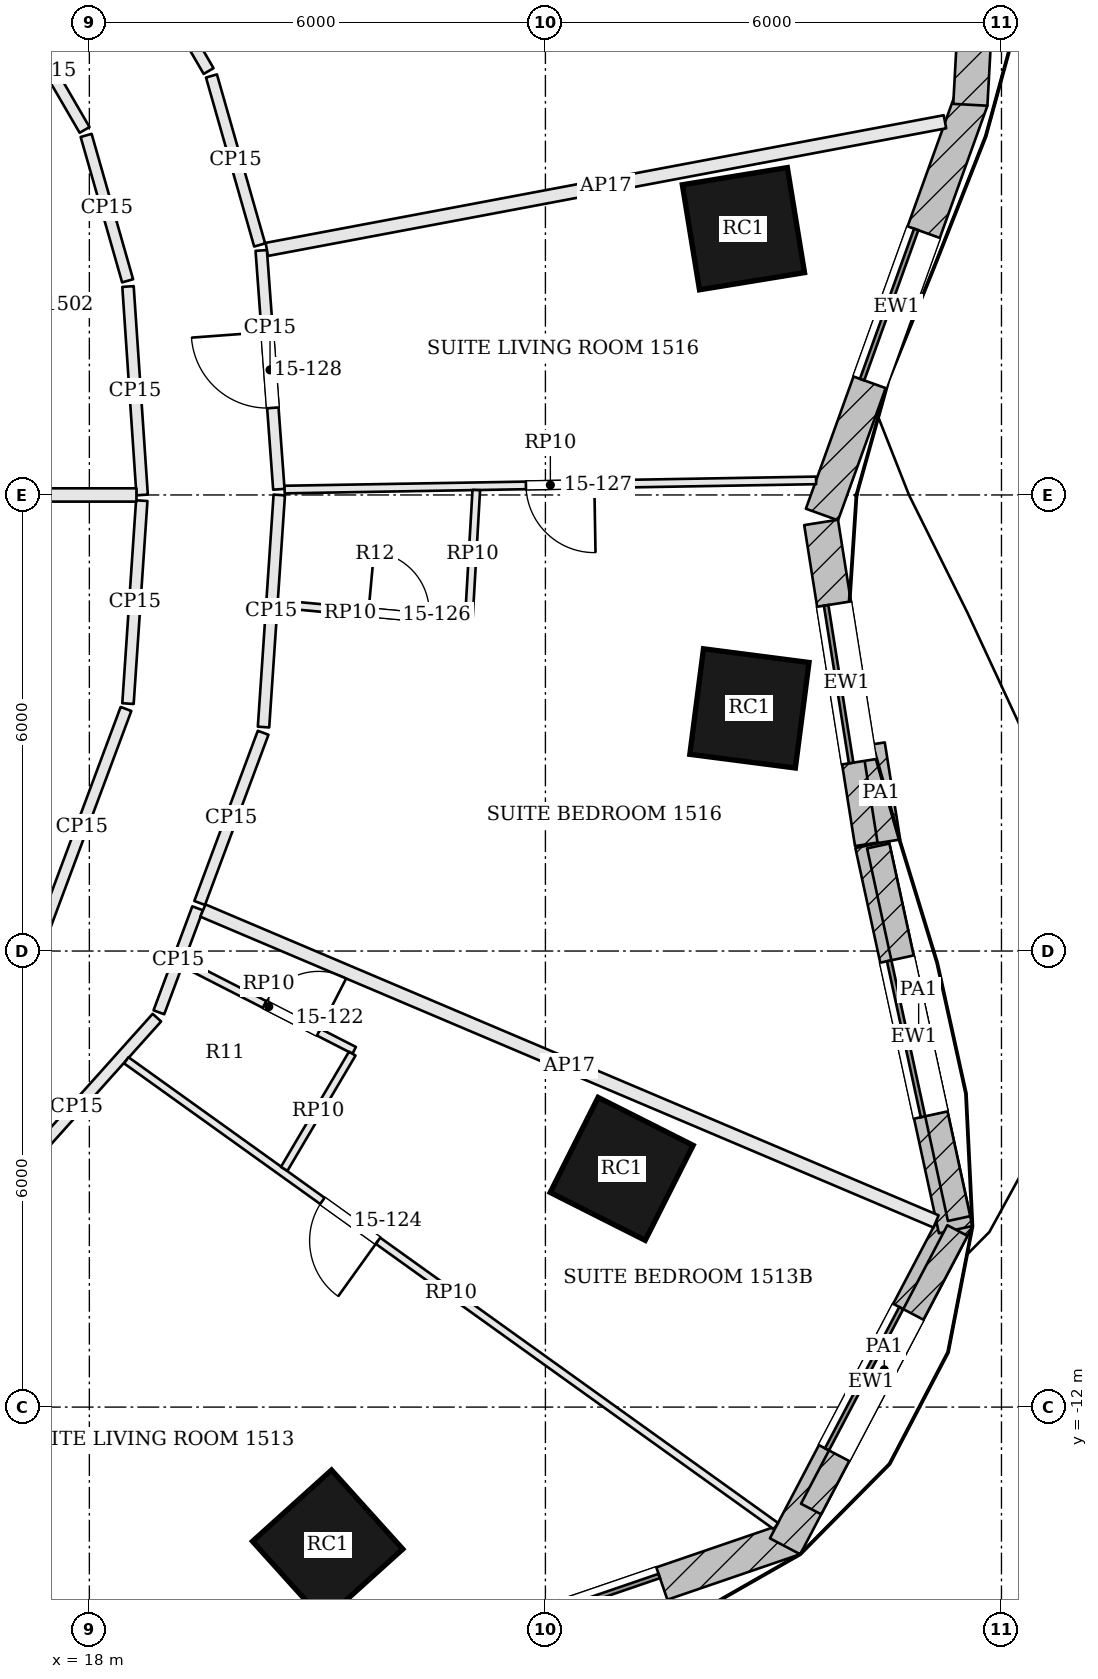
"""IFC4 building model, lengths in metres.
Left out: names, types, materials, properties, quantities, classifications, styles, units other than length and angle.
Written with IfcOpenShell. Run it as: python <this file> out.ifc"""

import sys

from ifc_helpers import new_model, si_unit, direction, frame, frame_2d, origin, origin_2d, place, context, subcontext, project, spatial, rectangle, extrude, element, fill, save


model = new_model("IFC4")
c1 = context("Model", 3, precision=1e-05, world=origin(), true_north=direction((0.0, 1.0)))
c2 = subcontext(c1, "Body", "Model", "MODEL_VIEW")
j1 = project(units=[si_unit("LENGTHUNIT", "METRE"), si_unit("PLANEANGLEUNIT", "RADIAN")], contexts=[c1])
p1 = place(None, origin())
s1 = spatial("IfcSite", under=j1, at=p1, CompositionType="ELEMENT")
p2 = place(p1, origin())
s2 = spatial("IfcBuilding", under=s1, at=p2, CompositionType="ELEMENT")
p3 = place(p2, frame((0.0, 0.0, 69.9)))
s3 = spatial("IfcBuildingStorey", under=s2, at=p3, CompositionType="ELEMENT", Elevation=69.9)
for number, where, z_axis, x_axis in (
    (1, (26.605, 3.503, 0.0), (0.0, 0.0, 1.0), (-0.161, 0.987, 0.0)),
    (2, (21.135, -13.817, 0.0), (0.0, 0.0, 1.0), (0.743, 0.67, 0.0)),
    (3, (25.003, -8.866, 0.0), (0.0, 0.0, 1.0), (0.45, 0.893, 0.0)),
    (4, (26.684, -2.808, 0.0), (0.0, 0.0, 1.0), (0.128, 0.992, 0.0)),
):
    element("IfcColumn", number, at=place(p3, frame(where, z_axis=z_axis, x_axis=x_axis)), inside=s3, PredefinedType="COLUMN", context=c2, shape_type="SweptSolid", body=[
        extrude(rectangle(XDim=1.4, YDim=1.4, at=origin_2d()), origin(), (0.0, 0.0, 1.0), 3.6),
    ])
p4 = place(p3, frame((27.638, -0.257, 0.0), z_axis=(0.0, 0.0, 1.0), x_axis=(0.338914809068, 0.940817066275, 0.0)))
e5 = element("IfcWall", 5, at=p4, inside=s3, PredefinedType="SOLIDWALL", context=c2, shape_type="SweptSolid", body=[
    extrude(rectangle(XDim=5.797, YDim=0.45, at=frame_2d((2.899, 0.0))), origin(), (0.0, 0.0, 1.0), 3.4),
])
p5 = place(p4, frame((1.849, 0.0, 0.9)))
e6 = element("IfcOpeningElement", 6, at=p5, cuts=e5, PredefinedType="OPENING", context=c2, shape_type="SweptSolid", body=[
    extrude(rectangle(XDim=2.1, YDim=2.0, at=frame_2d((1.05, 1.0))), frame((0.0, 0.235, 0.0), z_axis=(0.0, -1.0, 0.0), x_axis=(1.0, 0.0, 0.0)), (0.0, 0.0, 1.0), 0.47),
])
p6 = place(p3, frame((29.59, 5.133, 0.0), z_axis=(0.0, 0.0, 1.0), x_axis=(0.054738225791, 0.998500739427, 0.0)))
e7 = element("IfcWall", 7, at=p6, inside=s3, PredefinedType="SOLIDWALL", context=c2, shape_type="SweptSolid", body=[
    extrude(rectangle(XDim=4.656, YDim=0.45, at=frame_2d((2.328, 0.0))), origin(), (0.0, 0.0, 1.0), 3.4),
])
p7 = place(p6, frame((1.278, 0.0, 0.9)))
e8 = element("IfcOpeningElement", 8, at=p7, cuts=e7, PredefinedType="OPENING", context=c2, shape_type="SweptSolid", body=[
    extrude(rectangle(XDim=2.1, YDim=2.0, at=frame_2d((1.05, 1.0))), frame((0.0, 0.235, 0.0), z_axis=(0.0, -1.0, 0.0), x_axis=(1.0, 0.0, 0.0)), (0.0, 0.0, 1.0), 0.47),
])
p8 = place(p3, frame((21.803, -15.597, 0.0), z_axis=(0.0, 0.0, 1.0), x_axis=(0.946115314877, 0.323829910532, 0.0)))
e9 = element("IfcWall", 9, at=p8, inside=s3, PredefinedType="SOLIDWALL", context=c2, shape_type="SweptSolid", body=[
    extrude(rectangle(XDim=5.782, YDim=0.45, at=frame_2d((2.891, 0.0))), origin(), (0.0, 0.0, 1.0), 3.4),
])
p9 = place(p8, frame((1.841, 0.0, 0.9)))
e10 = element("IfcOpeningElement", 10, at=p9, cuts=e9, PredefinedType="OPENING", context=c2, shape_type="SweptSolid", body=[
    extrude(rectangle(XDim=2.1, YDim=2.0, at=frame_2d((1.05, 1.0))), frame((0.0, 0.235, 0.0), z_axis=(0.0, -1.0, 0.0), x_axis=(1.0, 0.0, 0.0)), (0.0, 0.0, 1.0), 0.47),
])
p10 = place(p3, frame((27.153, -13.831, 0.0), z_axis=(0.0, 0.0, 1.0), x_axis=(0.465165872942, 0.885223537108, 0.0)))
e11 = element("IfcWall", 11, at=p10, inside=s3, PredefinedType="SOLIDWALL", context=c2, shape_type="SweptSolid", body=[
    extrude(rectangle(XDim=4.871, YDim=0.45, at=frame_2d((2.436, 0.0))), origin(), (0.0, 0.0, 1.0), 3.4),
])
p11 = place(p10, frame((1.385, 0.0, 0.9)))
e12 = element("IfcOpeningElement", 12, at=p11, cuts=e11, PredefinedType="OPENING", context=c2, shape_type="SweptSolid", body=[
    extrude(rectangle(XDim=2.1, YDim=2.0, at=frame_2d((1.05, 1.0))), frame((0.0, 0.235, 0.0), z_axis=(0.0, -1.0, 0.0), x_axis=(1.0, 0.0, 0.0)), (0.0, 0.0, 1.0), 0.47),
])
p12 = place(p3, frame((29.397, -9.666, 0.0), z_axis=(0.0, 0.0, 1.0), x_axis=(-0.211962455994, 0.977277809657, 0.0)))
e13 = element("IfcWall", 13, at=p12, inside=s3, PredefinedType="SOLIDWALL", context=c2, shape_type="SweptSolid", body=[
    extrude(rectangle(XDim=5.186, YDim=0.45, at=frame_2d((2.593, 0.0))), origin(), (0.0, 0.0, 1.0), 3.4),
])
p13 = place(p12, frame((1.543, 0.0, 0.9)))
e14 = element("IfcOpeningElement", 14, at=p13, cuts=e13, PredefinedType="OPENING", context=c2, shape_type="SweptSolid", body=[
    extrude(rectangle(XDim=2.1, YDim=2.0, at=frame_2d((1.05, 1.0))), frame((0.0, 0.235, 0.0), z_axis=(0.0, -1.0, 0.0), x_axis=(1.0, 0.0, 0.0)), (0.0, 0.0, 1.0), 0.47),
])
p14 = place(p3, frame((28.296, -4.584, 0.0), z_axis=(0.0, 0.0, 1.0), x_axis=(-0.156402397796, 0.987693419014, 0.0)))
e15 = element("IfcWall", 15, at=p14, inside=s3, PredefinedType="SOLIDWALL", context=c2, shape_type="SweptSolid", body=[
    extrude(rectangle(XDim=4.276, YDim=0.45, at=frame_2d((2.138, 0.0))), origin(), (0.0, 0.0, 1.0), 3.4),
])
p15 = place(p14, frame((1.088, 0.0, 0.9)))
e16 = element("IfcOpeningElement", 16, at=p15, cuts=e15, PredefinedType="OPENING", context=c2, shape_type="SweptSolid", body=[
    extrude(rectangle(XDim=2.1, YDim=2.0, at=frame_2d((1.05, 1.0))), frame((0.0, 0.235, 0.0), z_axis=(0.0, -1.0, 0.0), x_axis=(1.0, 0.0, 0.0)), (0.0, 0.0, 1.0), 0.47),
])
p16 = place(p3, frame((27.495, -13.341, 3.6), z_axis=(0.0, 0.0, 1.0), x_axis=(0.46519687666, 0.88520724463, 0.0)))
e17 = element("IfcWall", 17, at=p16, inside=s3, PredefinedType="PARAPET", context=c2, shape_type="SweptSolid", body=[
    extrude(rectangle(XDim=4.139, YDim=0.3, at=frame_2d((2.069, 0.0))), origin(), (0.0, 0.0, 1.0), 1.1),
])
p17 = place(p3, frame((29.442, -9.52, 3.6), z_axis=(0.0, 0.0, 1.0), x_axis=(-0.211918382355, 0.977287367779, 0.0)))
e18 = element("IfcWall", 18, at=p17, inside=s3, PredefinedType="PARAPET", context=c2, shape_type="SweptSolid", body=[
    extrude(rectangle(XDim=5.016, YDim=0.3, at=frame_2d((2.508, 0.0))), origin(), (0.0, 0.0, 1.0), 1.1),
])
p18 = place(p3, frame((28.519, -4.556, 3.6), z_axis=(0.0, 0.0, 1.0), x_axis=(-0.156466543472, 0.987683259337, 0.0)))
e19 = element("IfcWall", 19, at=p18, inside=s3, PredefinedType="PARAPET", context=c2, shape_type="SweptSolid", body=[
    extrude(rectangle(XDim=1.293, YDim=0.3, at=frame_2d((0.647, 0.0))), origin(), (0.0, 0.0, 1.0), 1.1),
])
p19 = place(p3, frame((16.781, -9.228, 0.0), z_axis=(0.0, 0.0, 1.0), x_axis=(0.667305516611, 0.744784094554, 0.0)))
e20 = element("IfcWall", 20, at=p19, inside=s3, PredefinedType="PARTITIONING", context=c2, shape_type="SweptSolid", body=[
    extrude(rectangle(XDim=3.157, YDim=0.15, at=frame_2d((1.579, 0.0))), origin(), (0.0, 0.0, 1.0), 2.68),
])
p20 = place(p3, frame((18.915, -6.806, 0.0), z_axis=(0.0, 0.0, 1.0), x_axis=(0.349345122546, 0.936994122368, 0.0)))
e21 = element("IfcWall", 21, at=p20, inside=s3, PredefinedType="PARTITIONING", context=c2, shape_type="SweptSolid", body=[
    extrude(rectangle(XDim=1.46, YDim=0.15, at=frame_2d((0.73, 0.0))), origin(), (0.0, 0.0, 1.0), 2.68),
])
p21 = place(p3, frame((29.139, -9.557, 0.0), z_axis=(0.0, 0.0, 1.0), x_axis=(-0.920644988054, 0.390400827318, 0.0)))
e22 = element("IfcWall", 22, at=p21, inside=s3, PredefinedType="PARTITIONING", context=c2, shape_type="SweptSolid", body=[
    extrude(rectangle(XDim=10.477, YDim=0.175, at=frame_2d((5.238, 0.0))), origin(), (0.0, 0.0, 1.0), 2.68),
])
p22 = place(p3, frame((19.451, -5.368, 0.0), z_axis=(0.0, 0.0, 1.0), x_axis=(0.349432605922, 0.936961500766, 0.0)))
e23 = element("IfcWall", 23, at=p22, inside=s3, PredefinedType="PARTITIONING", context=c2, shape_type="SweptSolid", body=[
    extrude(rectangle(XDim=2.39, YDim=0.15, at=frame_2d((1.195, 0.0))), origin(), (0.0, 0.0, 1.0), 2.68),
])
p23 = place(p3, frame((20.292, -3.053, 0.0), z_axis=(0.0, 0.0, 1.0), x_axis=(0.067646719267, 0.997709337118, 0.0)))
e24 = element("IfcWall", 24, at=p23, inside=s3, PredefinedType="PARTITIONING", context=c2, shape_type="SweptSolid", body=[
    extrude(rectangle(XDim=3.061, YDim=0.15, at=frame_2d((1.53, 0.0))), origin(), (0.0, 0.0, 1.0), 2.68),
])
p24 = place(p3, frame((20.493, 0.075, 0.0), z_axis=(0.0, 0.0, 1.0), x_axis=(-0.073620484391, 0.997286330137, 0.0)))
e25 = element("IfcWall", 25, at=p24, inside=s3, PredefinedType="PARTITIONING", context=c2, shape_type="SweptSolid", body=[
    extrude(rectangle(XDim=3.15, YDim=0.15, at=frame_2d((1.575, 0.0))), origin(), (0.0, 0.0, 1.0), 2.68),
])
p25 = place(p24, frame((1.074, 0.0, 0.0)))
e26 = element("IfcOpeningElement", 26, at=p25, cuts=e25, PredefinedType="OPENING", context=c2, shape_type="SweptSolid", body=[
    extrude(rectangle(XDim=1.0, YDim=2.1, at=frame_2d((0.5, 1.05))), frame((0.0, 0.085, 0.0), z_axis=(0.0, -1.0, 0.0), x_axis=(1.0, 0.0, 0.0)), (0.0, 0.0, 1.0), 0.17),
])
p26 = place(p3, frame((29.257, 4.91, 0.0), z_axis=(0.0, 0.0, 1.0), x_axis=(-0.982744388162, -0.184968828552, 0.0)))
e27 = element("IfcWall", 27, at=p26, inside=s3, PredefinedType="PARTITIONING", context=c2, shape_type="SweptSolid", body=[
    extrude(rectangle(XDim=9.078, YDim=0.175, at=frame_2d((4.539, 0.0))), origin(), (0.0, 0.0, 1.0), 2.68),
])
p27 = place(p3, frame((20.24, 3.289, 0.0), z_axis=(0.0, 0.0, 1.0), x_axis=(-0.27423295978, 0.961663290227, 0.0)))
e28 = element("IfcWall", 28, at=p27, inside=s3, PredefinedType="PARTITIONING", context=c2, shape_type="SweptSolid", body=[
    extrude(rectangle(XDim=2.312, YDim=0.15, at=frame_2d((1.156, 0.0))), origin(), (0.0, 0.0, 1.0), 2.68),
])
p28 = place(p3, frame((19.569, 5.577, 0.0), z_axis=(0.0, 0.0, 1.0), x_axis=(-0.502457989762, 0.864601624174, 0.0)))
e29 = element("IfcWall", 29, at=p28, inside=s3, PredefinedType="PARTITIONING", context=c2, shape_type="SweptSolid", body=[
    extrude(rectangle(XDim=2.246, YDim=0.15, at=frame_2d((1.123, 0.0))), origin(), (0.0, 0.0, 1.0), 2.68),
])
p29 = place(p3, frame((17.032, 6.36, 0.0), z_axis=(0.0, 0.0, 1.0), x_axis=(0.502488551999, -0.864583862393, 0.0)))
e30 = element("IfcWall", 30, at=p29, inside=s3, PredefinedType="PARTITIONING", context=c2, shape_type="SweptSolid", body=[
    extrude(rectangle(XDim=1.802, YDim=0.15, at=frame_2d((0.901, 0.0))), origin(), (0.0, 0.0, 1.0), 2.68),
])
p30 = place(p3, frame((17.958, 4.73, 0.0), z_axis=(0.0, 0.0, 1.0), x_axis=(0.274315841816, -0.961639651288, 0.0)))
e31 = element("IfcWall", 31, at=p30, inside=s3, PredefinedType="PARTITIONING", context=c2, shape_type="SweptSolid", body=[
    extrude(rectangle(XDim=1.989, YDim=0.15, at=frame_2d((0.995, 0.0))), origin(), (0.0, 0.0, 1.0), 2.68),
])
p31 = place(p3, frame((18.508, 2.742, 0.0), z_axis=(0.0, 0.0, 1.0), x_axis=(0.067774714774, -0.997700650515, 0.0)))
e32 = element("IfcWall", 32, at=p31, inside=s3, PredefinedType="PARTITIONING", context=c2, shape_type="SweptSolid", body=[
    extrude(rectangle(XDim=2.749, YDim=0.15, at=frame_2d((1.374, 0.0))), origin(), (0.0, 0.0, 1.0), 2.68),
])
p32 = place(p3, frame((18.689, -0.075, 0.0), z_axis=(0.0, 0.0, 1.0), x_axis=(-0.067687508044, -0.997706570718, 0.0)))
e33 = element("IfcWall", 33, at=p32, inside=s3, PredefinedType="PARTITIONING", context=c2, shape_type="SweptSolid", body=[
    extrude(rectangle(XDim=2.676, YDim=0.15, at=frame_2d((1.338, 0.0))), origin(), (0.0, 0.0, 1.0), 2.68),
])
p33 = place(p3, frame((18.482, -2.815, 0.0), z_axis=(0.0, 0.0, 1.0), x_axis=(-0.349448047934, -0.936955741642, 0.0)))
e34 = element("IfcWall", 34, at=p33, inside=s3, PredefinedType="PARTITIONING", context=c2, shape_type="SweptSolid", body=[
    extrude(rectangle(XDim=3.323, YDim=0.15, at=frame_2d((1.661, 0.0))), origin(), (0.0, 0.0, 1.0), 2.68),
])
p34 = place(p3, frame((27.033, -13.565, 0.0), z_axis=(0.0, 0.0, 1.0), x_axis=(-0.812696934536, 0.582686616112, 0.0)))
e35 = element("IfcWall", 35, at=p34, inside=s3, PredefinedType="PARTITIONING", context=c2, shape_type="SweptSolid", body=[
    extrude(rectangle(XDim=10.517, YDim=0.1, at=frame_2d((5.258, 0.0))), origin(), (0.0, 0.0, 1.0), 2.898),
])
p35 = place(p34, frame((6.442, 0.0, 0.0)))
e36 = element("IfcOpeningElement", 36, at=p35, cuts=e35, PredefinedType="OPENING", context=c2, shape_type="SweptSolid", body=[
    extrude(rectangle(XDim=0.9, YDim=2.4, at=frame_2d((0.45, 1.2))), frame((0.0, 0.06, 0.0), z_axis=(0.0, -1.0, 0.0), x_axis=(1.0, 0.0, 0.0)), (0.0, 0.0, 1.0), 0.12),
])
p36 = place(p3, frame((19.237, -6.156, 0.0), z_axis=(0.0, 0.0, 1.0), x_axis=(0.890073027503, -0.455817952379, 0.0)))
e37 = element("IfcWall", 37, at=p36, inside=s3, PredefinedType="PARTITIONING", context=c2, shape_type="SweptSolid", body=[
    extrude(rectangle(XDim=2.525, YDim=0.1, at=frame_2d((1.262, 0.0))), origin(), (0.0, 0.0, 1.0), 2.898),
])
p37 = place(p36, frame((1.2, 0.0, 0.0)))
e38 = element("IfcOpeningElement", 38, at=p37, cuts=e37, PredefinedType="OPENING", context=c2, shape_type="SweptSolid", body=[
    extrude(rectangle(XDim=0.8, YDim=2.1, at=frame_2d((0.4, 1.05))), frame((0.0, 0.06, 0.0), z_axis=(0.0, -1.0, 0.0), x_axis=(1.0, 0.0, 0.0)), (0.0, 0.0, 1.0), 0.12),
])
p38 = place(p3, frame((21.459, -7.35, 0.0), z_axis=(0.0, 0.0, 1.0), x_axis=(-0.508631201266, -0.860984495272, 0.0)))
e39 = element("IfcWall", 39, at=p38, inside=s3, PredefinedType="PARTITIONING", context=c2, shape_type="SweptSolid", body=[
    extrude(rectangle(XDim=1.761, YDim=0.1, at=frame_2d((0.88, 0.0))), origin(), (0.0, 0.0, 1.0), 2.898),
])
p39 = place(p3, frame((27.561, 0.192, 0.0), z_axis=(0.0, 0.0, 1.0), x_axis=(-0.999851276026, -0.017246038071, 0.0)))
e40 = element("IfcWall", 40, at=p39, inside=s3, PredefinedType="PARTITIONING", context=c2, shape_type="SweptSolid", body=[
    extrude(rectangle(XDim=6.993, YDim=0.1, at=frame_2d((3.497, 0.0))), origin(), (0.0, 0.0, 1.0), 2.898),
])
p40 = place(p39, frame((2.918, 0.0, 0.0)))
e41 = element("IfcOpeningElement", 41, at=p40, cuts=e40, PredefinedType="OPENING", context=c2, shape_type="SweptSolid", body=[
    extrude(rectangle(XDim=0.9, YDim=2.4, at=frame_2d((0.45, 1.2))), frame((0.0, 0.06, 0.0), z_axis=(0.0, -1.0, 0.0), x_axis=(1.0, 0.0, 0.0)), (0.0, 0.0, 1.0), 0.12),
])
p41 = place(p3, frame((20.477, -1.434, 0.0), z_axis=(0.0, 0.0, 1.0), x_axis=(0.995745275682, -0.092148499488, 0.0)))
e42 = element("IfcWall", 42, at=p41, inside=s3, PredefinedType="PARTITIONING", context=c2, shape_type="SweptSolid", body=[
    extrude(rectangle(XDim=2.525, YDim=0.1, at=frame_2d((1.262, 0.0))), origin(), (0.0, 0.0, 1.0), 2.898),
])
p42 = place(p41, frame((1.2, 0.0, 0.0)))
e43 = element("IfcOpeningElement", 43, at=p42, cuts=e42, PredefinedType="OPENING", context=c2, shape_type="SweptSolid", body=[
    extrude(rectangle(XDim=0.8, YDim=2.1, at=frame_2d((0.4, 1.05))), frame((0.0, 0.06, 0.0), z_axis=(0.0, -1.0, 0.0), x_axis=(1.0, 0.0, 0.0)), (0.0, 0.0, 1.0), 0.12),
])
p43 = place(p3, frame((22.994, -1.616, 0.0), z_axis=(0.0, 0.0, 1.0), x_axis=(0.057557631077, 0.998342185378, 0.0)))
e44 = element("IfcWall", 44, at=p43, inside=s3, PredefinedType="PARTITIONING", context=c2, shape_type="SweptSolid", body=[
    extrude(rectangle(XDim=1.684, YDim=0.1, at=frame_2d((0.842, 0.0))), origin(), (0.0, 0.0, 1.0), 2.898),
])
p44 = place(p3, frame((14.875, 0.0, 0.0), z_axis=(0.0, 0.0, 1.0), x_axis=(1.0, 0.0, 0.0)))
e45 = element("IfcWall", 45, at=p44, inside=s3, PredefinedType="PARTITIONING", context=c2, shape_type="SweptSolid", body=[
    extrude(rectangle(XDim=3.744, YDim=0.175, at=frame_2d((1.872, 0.0))), origin(), (0.0, 0.0, 1.0), 2.68),
])
p45 = place(p5, origin())
e46 = element("IfcWindow", 46, at=p45, inside=s3, PartitioningType="SINGLE_PANEL", PredefinedType="WINDOW", context=c2, shape_type="SweptSolid", body=[
    extrude(rectangle(XDim=2.1, YDim=2.0, at=frame_2d((1.05, 1.0))), frame((0.0, 0.135, 0.0), z_axis=(0.0, -1.0, 0.0), x_axis=(1.0, 0.0, 0.0)), (0.0, 0.0, 1.0), 0.06),
])
fill(e6, e46)
p46 = place(p9, origin())
e47 = element("IfcWindow", 47, at=p46, inside=s3, PartitioningType="SINGLE_PANEL", PredefinedType="WINDOW", context=c2, shape_type="SweptSolid", body=[
    extrude(rectangle(XDim=2.1, YDim=2.0, at=frame_2d((1.05, 1.0))), frame((0.0, 0.135, 0.0), z_axis=(0.0, -1.0, 0.0), x_axis=(1.0, 0.0, 0.0)), (0.0, 0.0, 1.0), 0.06),
])
fill(e10, e47)
p47 = place(p11, origin())
e48 = element("IfcWindow", 48, at=p47, inside=s3, PartitioningType="SINGLE_PANEL", PredefinedType="WINDOW", context=c2, shape_type="SweptSolid", body=[
    extrude(rectangle(XDim=2.1, YDim=2.0, at=frame_2d((1.05, 1.0))), frame((0.0, 0.135, 0.0), z_axis=(0.0, -1.0, 0.0), x_axis=(1.0, 0.0, 0.0)), (0.0, 0.0, 1.0), 0.06),
])
fill(e12, e48)
p48 = place(p13, origin())
e49 = element("IfcWindow", 49, at=p48, inside=s3, PartitioningType="SINGLE_PANEL", PredefinedType="WINDOW", context=c2, shape_type="SweptSolid", body=[
    extrude(rectangle(XDim=2.1, YDim=2.0, at=frame_2d((1.05, 1.0))), frame((0.0, 0.135, 0.0), z_axis=(0.0, -1.0, 0.0), x_axis=(1.0, 0.0, 0.0)), (0.0, 0.0, 1.0), 0.06),
])
fill(e14, e49)
p49 = place(p15, origin())
e50 = element("IfcWindow", 50, at=p49, inside=s3, PartitioningType="SINGLE_PANEL", PredefinedType="WINDOW", context=c2, shape_type="SweptSolid", body=[
    extrude(rectangle(XDim=2.1, YDim=2.0, at=frame_2d((1.05, 1.0))), frame((0.0, 0.135, 0.0), z_axis=(0.0, -1.0, 0.0), x_axis=(1.0, 0.0, 0.0)), (0.0, 0.0, 1.0), 0.06),
])
fill(e16, e50)
p50 = place(p37, origin())
e51 = element("IfcDoor", 51, at=p50, inside=s3, OperationType="SINGLE_SWING_RIGHT", PredefinedType="DOOR", context=c2, shape_type="SweptSolid", body=[
    extrude(rectangle(XDim=0.8, YDim=2.1, at=frame_2d((0.4, 1.05))), frame((0.0, 0.025, 0.0), z_axis=(0.0, -1.0, 0.0), x_axis=(1.0, 0.0, 0.0)), (0.0, 0.0, 1.0), 0.05),
])
fill(e38, e51)
p51 = place(p35, origin())
e52 = element("IfcDoor", 52, at=p51, inside=s3, OperationType="SINGLE_SWING_LEFT", PredefinedType="DOOR", context=c2, shape_type="SweptSolid", body=[
    extrude(rectangle(XDim=0.9, YDim=2.4, at=frame_2d((0.45, 1.2))), frame((0.0, 0.025, 0.0), z_axis=(0.0, -1.0, 0.0), x_axis=(1.0, 0.0, 0.0)), (0.0, 0.0, 1.0), 0.05),
])
fill(e36, e52)
p52 = place(p42, origin())
e53 = element("IfcDoor", 53, at=p52, inside=s3, OperationType="SINGLE_SWING_LEFT", PredefinedType="DOOR", context=c2, shape_type="SweptSolid", body=[
    extrude(rectangle(XDim=0.8, YDim=2.1, at=frame_2d((0.4, 1.05))), frame((0.0, 0.025, 0.0), z_axis=(0.0, -1.0, 0.0), x_axis=(1.0, 0.0, 0.0)), (0.0, 0.0, 1.0), 0.05),
])
fill(e43, e53)
p53 = place(p40, origin())
e54 = element("IfcDoor", 54, at=p53, inside=s3, OperationType="SINGLE_SWING_LEFT", PredefinedType="DOOR", context=c2, shape_type="SweptSolid", body=[
    extrude(rectangle(XDim=0.9, YDim=2.4, at=frame_2d((0.45, 1.2))), frame((0.0, 0.025, 0.0), z_axis=(0.0, -1.0, 0.0), x_axis=(1.0, 0.0, 0.0)), (0.0, 0.0, 1.0), 0.05),
])
fill(e41, e54)
p54 = place(p25, origin())
e55 = element("IfcDoor", 55, at=p54, inside=s3, OperationType="SINGLE_SWING_RIGHT", PredefinedType="DOOR", context=c2, shape_type="SweptSolid", body=[
    extrude(rectangle(XDim=1.0, YDim=2.1, at=frame_2d((0.5, 1.05))), frame((0.0, 0.025, 0.0), z_axis=(0.0, -1.0, 0.0), x_axis=(1.0, 0.0, 0.0)), (0.0, 0.0, 1.0), 0.05),
])
fill(e26, e55)
save(model, sys.argv[1])
